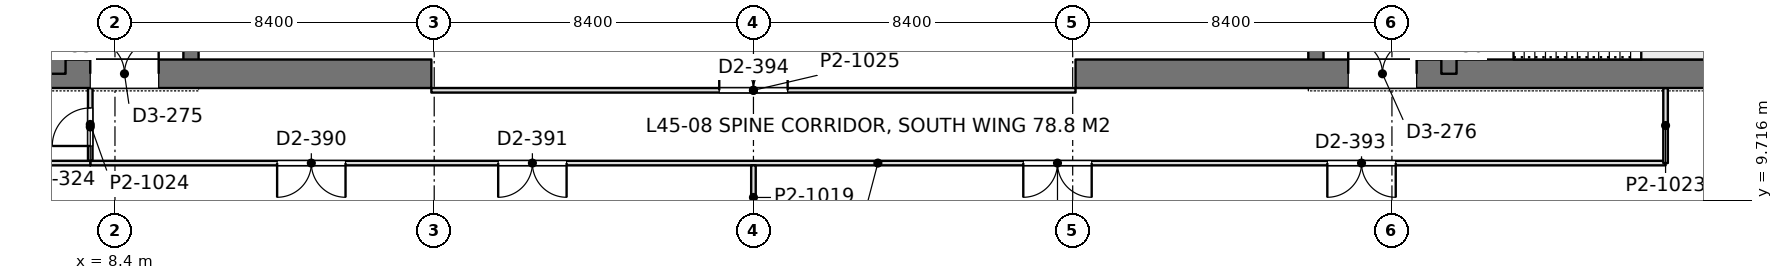
"""IFC4 building model, lengths in metres.
Left out: names, types, materials, properties, quantities, classifications, styles, units other than length and angle.
Written with IfcOpenShell. Run it as: python <this file> out.ifc"""

import sys

from ifc_helpers import new_model, si_unit, direction, frame, frame_2d, origin, place, context, subcontext, project, spatial, rectangle, extrude, element, fill, save


model = new_model("IFC4")
c1 = context("Model", 3, precision=1e-05, world=origin(), true_north=direction((0.0, 1.0)))
c2 = subcontext(c1, "Body", "Model", "MODEL_VIEW")
j1 = project(units=[si_unit("LENGTHUNIT", "METRE"), si_unit("PLANEANGLEUNIT", "RADIAN")], contexts=[c1])
p1 = place(None, origin())
s1 = spatial("IfcSite", under=j1, at=p1, CompositionType="ELEMENT")
p2 = place(p1, origin())
s2 = spatial("IfcBuilding", under=s1, at=p2, CompositionType="ELEMENT")
p3 = place(p2, frame((0.0, 0.0, 198.6)))
s3 = spatial("IfcBuildingStorey", under=s2, at=p3, CompositionType="ELEMENT", Elevation=198.6)
p4 = place(p3, frame((-1.125, 13.05, 0.0), z_axis=(0.0, 0.0, 1.0), x_axis=(1.0, 0.0, 0.0)))
e1 = element("IfcWall", 1, at=p4, inside=s3, PredefinedType="SHEAR", context=c2, shape_type="SweptSolid", body=[
    extrude(rectangle(XDim=17.85, YDim=0.75, at=frame_2d((8.925, 0.0))), origin(), (0.0, 0.0, 1.0), 4.2),
])
p5 = place(p4, frame((8.875, 0.0, 0.0)))
e2 = element("IfcOpeningElement", 2, at=p5, cuts=e1, PredefinedType="OPENING", context=c2, shape_type="SweptSolid", body=[
    extrude(rectangle(XDim=1.8, YDim=2.4, at=frame_2d((0.9, 1.2))), frame((0.0, 0.385, 0.0), z_axis=(0.0, -1.0, 0.0), x_axis=(1.0, 0.0, 0.0)), (0.0, 0.0, 1.0), 0.77),
])
p6 = place(p3, frame((6.9, 13.05, 0.0), z_axis=(0.0, 0.0, 1.0), x_axis=(0.0, 1.0, 0.0)))
e3 = element("IfcWall", 3, at=p6, inside=s3, PredefinedType="SHEAR", context=c2, shape_type="SweptSolid", body=[
    extrude(rectangle(XDim=24.3, YDim=0.4, at=frame_2d((12.15, 0.0))), origin(), (0.0, 0.0, 1.0), 4.2),
])
p7 = place(p6, frame((1.3, 0.0, 0.0)))
e4 = element("IfcOpeningElement", 4, at=p7, cuts=e3, PredefinedType="OPENING", context=c2, shape_type="SweptSolid", body=[
    extrude(rectangle(XDim=1.0, YDim=2.2, at=frame_2d((0.5, 1.1))), frame((0.0, 0.21, 0.0), z_axis=(0.0, -1.0, 0.0), x_axis=(1.0, 0.0, 0.0)), (0.0, 0.0, 1.0), 0.42),
])
p8 = place(p6, frame((22.0, 0.0, 0.0)))
e5 = element("IfcOpeningElement", 5, at=p8, cuts=e3, PredefinedType="OPENING", context=c2, shape_type="SweptSolid", body=[
    extrude(rectangle(XDim=1.0, YDim=2.2, at=frame_2d((0.5, 1.1))), frame((0.0, 0.21, 0.0), z_axis=(0.0, -1.0, 0.0), x_axis=(1.0, 0.0, 0.0)), (0.0, 0.0, 1.0), 0.42),
])
p9 = place(p6, frame((5.55, 0.0, 0.0)))
e6 = element("IfcOpeningElement", 6, at=p9, cuts=e3, PredefinedType="OPENING", context=c2, shape_type="SweptSolid", body=[
    extrude(rectangle(XDim=1.0, YDim=2.2, at=frame_2d((0.5, 1.1))), frame((0.0, 0.21, 0.0), z_axis=(0.0, -1.0, 0.0), x_axis=(1.0, 0.0, 0.0)), (0.0, 0.0, 1.0), 0.42),
])
p10 = place(p6, frame((9.55, 0.0, 0.0)))
e7 = element("IfcOpeningElement", 7, at=p10, cuts=e3, PredefinedType="OPENING", context=c2, shape_type="SweptSolid", body=[
    extrude(rectangle(XDim=1.0, YDim=2.2, at=frame_2d((0.5, 1.1))), frame((0.0, 0.21, 0.0), z_axis=(0.0, -1.0, 0.0), x_axis=(1.0, 0.0, 0.0)), (0.0, 0.0, 1.0), 0.42),
])
p11 = place(p6, frame((12.8, 0.0, 0.0)))
e8 = element("IfcOpeningElement", 8, at=p11, cuts=e3, PredefinedType="OPENING", context=c2, shape_type="SweptSolid", body=[
    extrude(rectangle(XDim=1.1, YDim=2.2, at=frame_2d((0.55, 1.1))), frame((0.0, 0.21, 0.0), z_axis=(0.0, -1.0, 0.0), x_axis=(1.0, 0.0, 0.0)), (0.0, 0.0, 1.0), 0.42),
])
p12 = place(p6, frame((15.538, 0.0, 0.0)))
e9 = element("IfcOpeningElement", 9, at=p12, cuts=e3, PredefinedType="OPENING", context=c2, shape_type="SweptSolid", body=[
    extrude(rectangle(XDim=1.1, YDim=2.2, at=frame_2d((0.55, 1.1))), frame((0.0, 0.21, 0.0), z_axis=(0.0, -1.0, 0.0), x_axis=(1.0, 0.0, 0.0)), (0.0, 0.0, 1.0), 0.42),
])
p13 = place(p6, frame((18.262, 0.0, 0.0)))
e10 = element("IfcOpeningElement", 10, at=p13, cuts=e3, PredefinedType="OPENING", context=c2, shape_type="SweptSolid", body=[
    extrude(rectangle(XDim=1.1, YDim=2.2, at=frame_2d((0.55, 1.1))), frame((0.0, 0.21, 0.0), z_axis=(0.0, -1.0, 0.0), x_axis=(1.0, 0.0, 0.0)), (0.0, 0.0, 1.0), 0.42),
])
p14 = place(p3, frame((10.4, 13.05, 0.0), z_axis=(0.0, 0.0, 1.0), x_axis=(0.0, 1.0, 0.0)))
e11 = element("IfcWall", 11, at=p14, inside=s3, PredefinedType="SHEAR", context=c2, shape_type="SweptSolid", body=[
    extrude(rectangle(XDim=24.3, YDim=0.4, at=frame_2d((12.15, 0.0))), origin(), (0.0, 0.0, 1.0), 4.2),
])
p15 = place(p14, frame((15.75, 0.0, 0.0)))
e12 = element("IfcOpeningElement", 12, at=p15, cuts=e11, PredefinedType="OPENING", context=c2, shape_type="SweptSolid", body=[
    extrude(rectangle(XDim=1.1, YDim=2.2, at=frame_2d((0.55, 1.1))), frame((0.0, 0.21, 0.0), z_axis=(0.0, -1.0, 0.0), x_axis=(1.0, 0.0, 0.0)), (0.0, 0.0, 1.0), 0.42),
])
p16 = place(p14, frame((18.6, 0.0, 0.0)))
e13 = element("IfcOpeningElement", 13, at=p16, cuts=e11, PredefinedType="OPENING", context=c2, shape_type="SweptSolid", body=[
    extrude(rectangle(XDim=1.1, YDim=2.2, at=frame_2d((0.55, 1.1))), frame((0.0, 0.21, 0.0), z_axis=(0.0, -1.0, 0.0), x_axis=(1.0, 0.0, 0.0)), (0.0, 0.0, 1.0), 0.42),
])
p17 = place(p14, frame((21.45, 0.0, 0.0)))
e14 = element("IfcOpeningElement", 14, at=p17, cuts=e11, PredefinedType="OPENING", context=c2, shape_type="SweptSolid", body=[
    extrude(rectangle(XDim=1.1, YDim=2.2, at=frame_2d((0.55, 1.1))), frame((0.0, 0.21, 0.0), z_axis=(0.0, -1.0, 0.0), x_axis=(1.0, 0.0, 0.0)), (0.0, 0.0, 1.0), 0.42),
])
p18 = place(p14, frame((6.05, 0.0, 0.0)))
e15 = element("IfcOpeningElement", 15, at=p18, cuts=e11, PredefinedType="OPENING", context=c2, shape_type="SweptSolid", body=[
    extrude(rectangle(XDim=1.8, YDim=2.4, at=frame_2d((0.9, 1.2))), frame((0.0, 0.21, 0.0), z_axis=(0.0, -1.0, 0.0), x_axis=(1.0, 0.0, 0.0)), (0.0, 0.0, 1.0), 0.42),
])
p19 = place(p14, frame((11.25, 0.0, 0.0)))
e16 = element("IfcOpeningElement", 16, at=p19, cuts=e11, PredefinedType="OPENING", context=c2, shape_type="SweptSolid", body=[
    extrude(rectangle(XDim=1.8, YDim=2.4, at=frame_2d((0.9, 1.2))), frame((0.0, 0.21, 0.0), z_axis=(0.0, -1.0, 0.0), x_axis=(1.0, 0.0, 0.0)), (0.0, 0.0, 1.0), 0.42),
])
p20 = place(p3, frame((33.675, 13.05, 0.0), z_axis=(0.0, 0.0, 1.0), x_axis=(1.0, 0.0, 0.0)))
e17 = element("IfcWall", 17, at=p20, inside=s3, PredefinedType="SHEAR", context=c2, shape_type="SweptSolid", body=[
    extrude(rectangle(XDim=17.85, YDim=0.75, at=frame_2d((8.925, 0.0))), origin(), (0.0, 0.0, 1.0), 4.2),
])
p21 = place(p20, frame((7.175, 0.0, 0.0)))
e18 = element("IfcOpeningElement", 18, at=p21, cuts=e17, PredefinedType="OPENING", context=c2, shape_type="SweptSolid", body=[
    extrude(rectangle(XDim=1.8, YDim=2.4, at=frame_2d((0.9, 1.2))), frame((0.0, 0.385, 0.0), z_axis=(0.0, -1.0, 0.0), x_axis=(1.0, 0.0, 0.0)), (0.0, 0.0, 1.0), 0.77),
])
p22 = place(p3, frame((43.5, 13.05, 0.0), z_axis=(0.0, 0.0, 1.0), x_axis=(0.0, 1.0, 0.0)))
e19 = element("IfcWall", 19, at=p22, inside=s3, PredefinedType="SHEAR", context=c2, shape_type="SweptSolid", body=[
    extrude(rectangle(XDim=24.3, YDim=0.4, at=frame_2d((12.15, 0.0))), origin(), (0.0, 0.0, 1.0), 4.2),
])
p23 = place(p22, frame((1.3, 0.0, 0.0)))
e20 = element("IfcOpeningElement", 20, at=p23, cuts=e19, PredefinedType="OPENING", context=c2, shape_type="SweptSolid", body=[
    extrude(rectangle(XDim=1.0, YDim=2.2, at=frame_2d((0.5, 1.1))), frame((0.0, 0.21, 0.0), z_axis=(0.0, -1.0, 0.0), x_axis=(1.0, 0.0, 0.0)), (0.0, 0.0, 1.0), 0.42),
])
p24 = place(p22, frame((22.0, 0.0, 0.0)))
e21 = element("IfcOpeningElement", 21, at=p24, cuts=e19, PredefinedType="OPENING", context=c2, shape_type="SweptSolid", body=[
    extrude(rectangle(XDim=1.0, YDim=2.2, at=frame_2d((0.5, 1.1))), frame((0.0, 0.21, 0.0), z_axis=(0.0, -1.0, 0.0), x_axis=(1.0, 0.0, 0.0)), (0.0, 0.0, 1.0), 0.42),
])
p25 = place(p22, frame((5.55, 0.0, 0.0)))
e22 = element("IfcOpeningElement", 22, at=p25, cuts=e19, PredefinedType="OPENING", context=c2, shape_type="SweptSolid", body=[
    extrude(rectangle(XDim=1.0, YDim=2.2, at=frame_2d((0.5, 1.1))), frame((0.0, 0.21, 0.0), z_axis=(0.0, -1.0, 0.0), x_axis=(1.0, 0.0, 0.0)), (0.0, 0.0, 1.0), 0.42),
])
p26 = place(p22, frame((9.55, 0.0, 0.0)))
e23 = element("IfcOpeningElement", 23, at=p26, cuts=e19, PredefinedType="OPENING", context=c2, shape_type="SweptSolid", body=[
    extrude(rectangle(XDim=1.0, YDim=2.2, at=frame_2d((0.5, 1.1))), frame((0.0, 0.21, 0.0), z_axis=(0.0, -1.0, 0.0), x_axis=(1.0, 0.0, 0.0)), (0.0, 0.0, 1.0), 0.42),
])
p27 = place(p22, frame((12.8, 0.0, 0.0)))
e24 = element("IfcOpeningElement", 24, at=p27, cuts=e19, PredefinedType="OPENING", context=c2, shape_type="SweptSolid", body=[
    extrude(rectangle(XDim=1.1, YDim=2.2, at=frame_2d((0.55, 1.1))), frame((0.0, 0.21, 0.0), z_axis=(0.0, -1.0, 0.0), x_axis=(1.0, 0.0, 0.0)), (0.0, 0.0, 1.0), 0.42),
])
p28 = place(p22, frame((15.538, 0.0, 0.0)))
e25 = element("IfcOpeningElement", 25, at=p28, cuts=e19, PredefinedType="OPENING", context=c2, shape_type="SweptSolid", body=[
    extrude(rectangle(XDim=1.1, YDim=2.2, at=frame_2d((0.55, 1.1))), frame((0.0, 0.21, 0.0), z_axis=(0.0, -1.0, 0.0), x_axis=(1.0, 0.0, 0.0)), (0.0, 0.0, 1.0), 0.42),
])
p29 = place(p22, frame((18.262, 0.0, 0.0)))
e26 = element("IfcOpeningElement", 26, at=p29, cuts=e19, PredefinedType="OPENING", context=c2, shape_type="SweptSolid", body=[
    extrude(rectangle(XDim=1.1, YDim=2.2, at=frame_2d((0.55, 1.1))), frame((0.0, 0.21, 0.0), z_axis=(0.0, -1.0, 0.0), x_axis=(1.0, 0.0, 0.0)), (0.0, 0.0, 1.0), 0.42),
])
p30 = place(p3, frame((40.0, 13.05, 0.0), z_axis=(0.0, 0.0, 1.0), x_axis=(0.0, 1.0, 0.0)))
e27 = element("IfcWall", 27, at=p30, inside=s3, PredefinedType="SHEAR", context=c2, shape_type="SweptSolid", body=[
    extrude(rectangle(XDim=24.3, YDim=0.4, at=frame_2d((12.15, 0.0))), origin(), (0.0, 0.0, 1.0), 4.2),
])
p31 = place(p30, frame((15.75, 0.0, 0.0)))
e28 = element("IfcOpeningElement", 28, at=p31, cuts=e27, PredefinedType="OPENING", context=c2, shape_type="SweptSolid", body=[
    extrude(rectangle(XDim=1.1, YDim=2.2, at=frame_2d((0.55, 1.1))), frame((0.0, 0.21, 0.0), z_axis=(0.0, -1.0, 0.0), x_axis=(1.0, 0.0, 0.0)), (0.0, 0.0, 1.0), 0.42),
])
p32 = place(p30, frame((18.6, 0.0, 0.0)))
e29 = element("IfcOpeningElement", 29, at=p32, cuts=e27, PredefinedType="OPENING", context=c2, shape_type="SweptSolid", body=[
    extrude(rectangle(XDim=1.1, YDim=2.2, at=frame_2d((0.55, 1.1))), frame((0.0, 0.21, 0.0), z_axis=(0.0, -1.0, 0.0), x_axis=(1.0, 0.0, 0.0)), (0.0, 0.0, 1.0), 0.42),
])
p33 = place(p30, frame((21.45, 0.0, 0.0)))
e30 = element("IfcOpeningElement", 30, at=p33, cuts=e27, PredefinedType="OPENING", context=c2, shape_type="SweptSolid", body=[
    extrude(rectangle(XDim=1.1, YDim=2.2, at=frame_2d((0.55, 1.1))), frame((0.0, 0.21, 0.0), z_axis=(0.0, -1.0, 0.0), x_axis=(1.0, 0.0, 0.0)), (0.0, 0.0, 1.0), 0.42),
])
p34 = place(p30, frame((6.05, 0.0, 0.0)))
e31 = element("IfcOpeningElement", 31, at=p34, cuts=e27, PredefinedType="OPENING", context=c2, shape_type="SweptSolid", body=[
    extrude(rectangle(XDim=1.8, YDim=2.4, at=frame_2d((0.9, 1.2))), frame((0.0, 0.21, 0.0), z_axis=(0.0, -1.0, 0.0), x_axis=(1.0, 0.0, 0.0)), (0.0, 0.0, 1.0), 0.42),
])
p35 = place(p30, frame((11.25, 0.0, 0.0)))
e32 = element("IfcOpeningElement", 32, at=p35, cuts=e27, PredefinedType="OPENING", context=c2, shape_type="SweptSolid", body=[
    extrude(rectangle(XDim=1.8, YDim=2.4, at=frame_2d((0.9, 1.2))), frame((0.0, 0.21, 0.0), z_axis=(0.0, -1.0, 0.0), x_axis=(1.0, 0.0, 0.0)), (0.0, 0.0, 1.0), 0.42),
])
p36 = place(p3, frame((25.2, 8.949, 0.0), z_axis=(0.0, 0.0, 1.0), x_axis=(0.0, 1.0, 0.0)))
e33 = element("IfcWall", 33, at=p36, inside=s3, PredefinedType="PARTITIONING", context=c2, shape_type="SweptSolid", body=[
    extrude(rectangle(XDim=1.693, YDim=0.12, at=frame_2d((0.847, 0.0))), origin(), (0.0, 0.0, 1.0), 3.55),
])
p37 = place(p3, frame((7.748, 10.7, 0.0), z_axis=(0.0, 0.0, 1.0), x_axis=(1.0, 0.0, 0.0)))
e34 = element("IfcWall", 34, at=p37, inside=s3, PredefinedType="PARTITIONING", context=c2, shape_type="SweptSolid", body=[
    extrude(rectangle(XDim=41.452, YDim=0.12, at=frame_2d((20.726, 0.0))), origin(), (0.0, 0.0, 1.0), 3.55),
])
p38 = place(p37, frame((4.919, 0.0, 0.0)))
e35 = element("IfcOpeningElement", 35, at=p38, cuts=e34, PredefinedType="OPENING", context=c2, shape_type="SweptSolid", body=[
    extrude(rectangle(XDim=1.8, YDim=2.2, at=frame_2d((0.9, 1.1))), frame((0.0, 0.07, 0.0), z_axis=(0.0, -1.0, 0.0), x_axis=(1.0, 0.0, 0.0)), (0.0, 0.0, 1.0), 0.14),
])
p39 = place(p37, frame((10.735, 0.0, 0.0)))
e36 = element("IfcOpeningElement", 36, at=p39, cuts=e34, PredefinedType="OPENING", context=c2, shape_type="SweptSolid", body=[
    extrude(rectangle(XDim=1.8, YDim=2.2, at=frame_2d((0.9, 1.1))), frame((0.0, 0.07, 0.0), z_axis=(0.0, -1.0, 0.0), x_axis=(1.0, 0.0, 0.0)), (0.0, 0.0, 1.0), 0.14),
])
p40 = place(p37, frame((24.552, 0.0, 0.0)))
e37 = element("IfcOpeningElement", 37, at=p40, cuts=e34, PredefinedType="OPENING", context=c2, shape_type="SweptSolid", body=[
    extrude(rectangle(XDim=1.8, YDim=2.2, at=frame_2d((0.9, 1.1))), frame((0.0, 0.07, 0.0), z_axis=(0.0, -1.0, 0.0), x_axis=(1.0, 0.0, 0.0)), (0.0, 0.0, 1.0), 0.14),
])
p41 = place(p37, frame((32.552, 0.0, 0.0)))
e38 = element("IfcOpeningElement", 38, at=p41, cuts=e34, PredefinedType="OPENING", context=c2, shape_type="SweptSolid", body=[
    extrude(rectangle(XDim=1.8, YDim=2.2, at=frame_2d((0.9, 1.1))), frame((0.0, 0.07, 0.0), z_axis=(0.0, -1.0, 0.0), x_axis=(1.0, 0.0, 0.0)), (0.0, 0.0, 1.0), 0.14),
])
p42 = place(p3, frame((7.75, 10.758, 0.0), z_axis=(0.0, 0.0, 1.0), x_axis=(0.0, 1.0, 0.0)))
e39 = element("IfcWall", 39, at=p42, inside=s3, PredefinedType="PARTITIONING", context=c2, shape_type="SweptSolid", body=[
    extrude(rectangle(XDim=1.918, YDim=0.12, at=frame_2d((0.959, 0.0))), origin(), (0.0, 0.0, 1.0), 4.05),
])
p43 = place(p42, frame((0.392, 0.0, 0.0)))
e40 = element("IfcOpeningElement", 40, at=p43, cuts=e39, PredefinedType="OPENING", context=c2, shape_type="SweptSolid", body=[
    extrude(rectangle(XDim=1.0, YDim=2.4, at=frame_2d((0.5, 1.2))), frame((0.0, 0.07, 0.0), z_axis=(0.0, -1.0, 0.0), x_axis=(1.0, 0.0, 0.0)), (0.0, 0.0, 1.0), 0.14),
])
p44 = place(p3, frame((49.2, 10.7, 0.0), z_axis=(0.0, 0.0, 1.0), x_axis=(0.0, 1.0, 0.0)))
e41 = element("IfcWall", 41, at=p44, inside=s3, PredefinedType="PARTITIONING", context=c2, shape_type="SweptSolid", body=[
    extrude(rectangle(XDim=1.976, YDim=0.12, at=frame_2d((0.988, 0.0))), origin(), (0.0, 0.0, 1.0), 4.05),
])
p45 = place(p3, frame((1.2, 10.7, 0.0), z_axis=(0.0, 0.0, 1.0), x_axis=(1.0, 0.0, 0.0)))
e42 = element("IfcWall", 42, at=p45, inside=s3, PredefinedType="PARTITIONING", context=c2, shape_type="SweptSolid", body=[
    extrude(rectangle(XDim=6.552, YDim=0.12, at=frame_2d((3.276, 0.0))), origin(), (0.0, 0.0, 1.0), 4.05),
])
p46 = place(p3, frame((16.725, 12.615, 0.0), z_axis=(0.0, 0.0, 1.0), x_axis=(1.0, 0.0, 0.0)))
e43 = element("IfcWall", 43, at=p46, inside=s3, PredefinedType="PARTITIONING", context=c2, shape_type="SweptSolid", body=[
    extrude(rectangle(XDim=16.95, YDim=0.12, at=frame_2d((8.475, 0.0))), origin(), (0.0, 0.0, 1.0), 3.55),
])
p47 = place(p46, frame((7.575, 0.0, 0.0)))
e44 = element("IfcOpeningElement", 44, at=p47, cuts=e43, PredefinedType="OPENING", context=c2, shape_type="SweptSolid", body=[
    extrude(rectangle(XDim=1.8, YDim=2.2, at=frame_2d((0.9, 1.1))), frame((0.0, 0.07, 0.0), z_axis=(0.0, -1.0, 0.0), x_axis=(1.0, 0.0, 0.0)), (0.0, 0.0, 1.0), 0.14),
])
p48 = place(p5, origin())
e45 = element("IfcDoor", 45, at=p48, inside=s3, OperationType="DOUBLE_DOOR_SINGLE_SWING", PredefinedType="DOOR", context=c2, shape_type="SweptSolid", body=[
    extrude(rectangle(XDim=1.8, YDim=2.4, at=frame_2d((0.9, 1.2))), frame((0.0, 0.025, 0.0), z_axis=(0.0, -1.0, 0.0), x_axis=(1.0, 0.0, 0.0)), (0.0, 0.0, 1.0), 0.05),
])
fill(e2, e45)
p49 = place(p21, origin())
e46 = element("IfcDoor", 46, at=p49, inside=s3, OperationType="DOUBLE_DOOR_SINGLE_SWING", PredefinedType="DOOR", context=c2, shape_type="SweptSolid", body=[
    extrude(rectangle(XDim=1.8, YDim=2.4, at=frame_2d((0.9, 1.2))), frame((0.0, 0.025, 0.0), z_axis=(0.0, -1.0, 0.0), x_axis=(1.0, 0.0, 0.0)), (0.0, 0.0, 1.0), 0.05),
])
fill(e18, e46)
p50 = place(p38, frame((1.8, 0.0, 0.0), z_axis=(0.0, 0.0, 1.0), x_axis=(-1.0, 0.0, 0.0)))
e47 = element("IfcDoor", 47, at=p50, inside=s3, OperationType="DOUBLE_DOOR_SINGLE_SWING", PredefinedType="DOOR", context=c2, shape_type="SweptSolid", body=[
    extrude(rectangle(XDim=1.8, YDim=2.2, at=frame_2d((0.9, 1.1))), frame((0.0, 0.025, 0.0), z_axis=(0.0, -1.0, 0.0), x_axis=(1.0, 0.0, 0.0)), (0.0, 0.0, 1.0), 0.05),
])
fill(e35, e47)
p51 = place(p39, frame((1.8, 0.0, 0.0), z_axis=(0.0, 0.0, 1.0), x_axis=(-1.0, 0.0, 0.0)))
e48 = element("IfcDoor", 48, at=p51, inside=s3, OperationType="DOUBLE_DOOR_SINGLE_SWING", PredefinedType="DOOR", context=c2, shape_type="SweptSolid", body=[
    extrude(rectangle(XDim=1.8, YDim=2.2, at=frame_2d((0.9, 1.1))), frame((0.0, 0.025, 0.0), z_axis=(0.0, -1.0, 0.0), x_axis=(1.0, 0.0, 0.0)), (0.0, 0.0, 1.0), 0.05),
])
fill(e36, e48)
p52 = place(p40, frame((1.8, 0.0, 0.0), z_axis=(0.0, 0.0, 1.0), x_axis=(-1.0, 0.0, 0.0)))
e49 = element("IfcDoor", 49, at=p52, inside=s3, OperationType="DOUBLE_DOOR_SINGLE_SWING", PredefinedType="DOOR", context=c2, shape_type="SweptSolid", body=[
    extrude(rectangle(XDim=1.8, YDim=2.2, at=frame_2d((0.9, 1.1))), frame((0.0, 0.025, 0.0), z_axis=(0.0, -1.0, 0.0), x_axis=(1.0, 0.0, 0.0)), (0.0, 0.0, 1.0), 0.05),
])
fill(e37, e49)
p53 = place(p41, frame((1.8, 0.0, 0.0), z_axis=(0.0, 0.0, 1.0), x_axis=(-1.0, 0.0, 0.0)))
e50 = element("IfcDoor", 50, at=p53, inside=s3, OperationType="DOUBLE_DOOR_SINGLE_SWING", PredefinedType="DOOR", context=c2, shape_type="SweptSolid", body=[
    extrude(rectangle(XDim=1.8, YDim=2.2, at=frame_2d((0.9, 1.1))), frame((0.0, 0.025, 0.0), z_axis=(0.0, -1.0, 0.0), x_axis=(1.0, 0.0, 0.0)), (0.0, 0.0, 1.0), 0.05),
])
fill(e38, e50)
p54 = place(p43, origin())
e51 = element("IfcDoor", 51, at=p54, inside=s3, OperationType="SINGLE_SWING_LEFT", PredefinedType="DOOR", context=c2, shape_type="SweptSolid", body=[
    extrude(rectangle(XDim=1.0, YDim=2.4, at=frame_2d((0.5, 1.2))), frame((0.0, 0.025, 0.0), z_axis=(0.0, -1.0, 0.0), x_axis=(1.0, 0.0, 0.0)), (0.0, 0.0, 1.0), 0.05),
])
fill(e40, e51)
p55 = place(p47, origin())
e52 = element("IfcDoor", 52, at=p55, inside=s3, OperationType="DOUBLE_DOOR_SINGLE_SWING", PredefinedType="DOOR", context=c2, shape_type="SweptSolid", body=[
    extrude(rectangle(XDim=1.8, YDim=2.2, at=frame_2d((0.9, 1.1))), frame((0.0, 0.025, 0.0), z_axis=(0.0, -1.0, 0.0), x_axis=(1.0, 0.0, 0.0)), (0.0, 0.0, 1.0), 0.05),
])
fill(e44, e52)
save(model, sys.argv[1])
